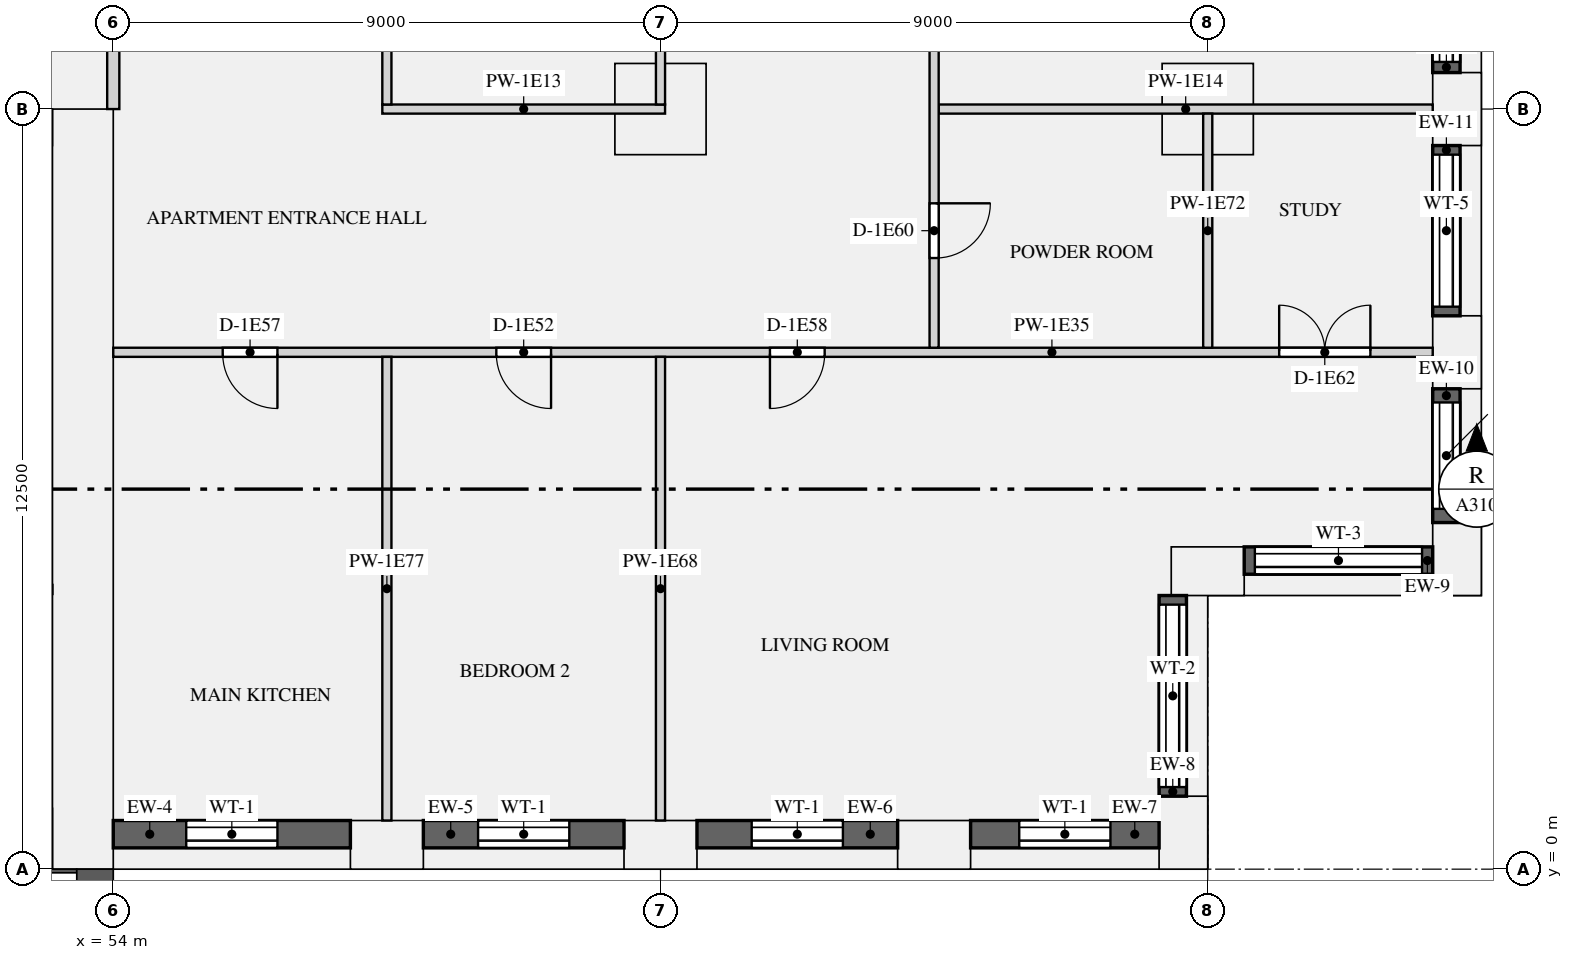
"""IFC4 building model, lengths in metres.
Left out: names, types, materials, properties, quantities, classifications, styles, units other than length and angle.
Written with IfcOpenShell. Run it as: python <this file> out.ifc"""

import sys

from ifc_helpers import new_model, si_unit, direction, frame, frame_2d, origin, origin_2d, place, context, subcontext, project, spatial, rectangle, extrude, element, fill, save


model = new_model("IFC4")
c1 = context("Model", 3, precision=1e-05, world=origin(), true_north=direction((0.0, 1.0)))
c2 = subcontext(c1, "Body", "Model", "MODEL_VIEW")
j1 = project(units=[si_unit("LENGTHUNIT", "METRE"), si_unit("PLANEANGLEUNIT", "RADIAN")], contexts=[c1])
p1 = place(None, origin())
s1 = spatial("IfcSite", under=j1, at=p1, CompositionType="ELEMENT")
p2 = place(p1, origin())
s2 = spatial("IfcBuilding", under=s1, at=p2, CompositionType="ELEMENT")
p3 = place(p2, frame((0.0, 0.0, 54.15)))
s3 = spatial("IfcBuildingStorey", under=s2, at=p3, CompositionType="ELEMENT", Elevation=54.15)
for number, where, z_axis, x_axis in (
    (1, (58.5, 0.4, 0.0), (0.0, 0.0, 1.0), (1.0, 0.0, 0.0)),
    (2, (63.0, 0.4, 0.0), (0.0, 0.0, 1.0), (1.0, 0.0, 0.0)),
    (3, (67.5, 0.4, 0.0), (0.0, 0.0, 1.0), (1.0, 0.0, 0.0)),
    (4, (71.6, 0.6, 0.0), (0.0, 0.0, 1.0), (0.0, 1.0, 0.0)),
    (5, (72.0, 4.9, 0.0), (0.0, 0.0, 1.0), (1.0, 0.0, 0.0)),
    (6, (76.1, 5.1, 0.0), (0.0, 0.0, 1.0), (0.0, 1.0, 0.0)),
    (7, (76.1, 8.5, 0.0), (0.0, 0.0, 1.0), (0.0, 1.0, 0.0)),
    (8, (76.1, 12.5, 0.0), (0.0, 0.0, 1.0), (0.0, 1.0, 0.0)),
):
    element("IfcColumn", number, at=place(p3, frame(where, z_axis=z_axis, x_axis=x_axis)), inside=s3, PredefinedType="USERDEFINED", context=c2, shape_type="SweptSolid", body=[
        extrude(rectangle(XDim=1.2, YDim=0.8, at=origin_2d()), origin(), (0.0, 0.0, 1.0), 3.15),
    ])
for number, where, z_axis, x_axis in (
    (9, (63.0, 12.5, 0.0), (0.0, 0.0, 1.0), (1.0, 0.0, 0.0)),
    (10, (72.0, 12.5, 0.0), (0.0, 0.0, 1.0), (1.0, 0.0, 0.0)),
):
    element("IfcColumn", number, at=place(p3, frame(where, z_axis=z_axis, x_axis=x_axis)), inside=s3, PredefinedType="COLUMN", context=c2, shape_type="SweptSolid", body=[
        extrude(rectangle(XDim=1.5, YDim=1.5, at=origin_2d()), origin(), (0.0, 0.0, 1.0), 3.15),
    ])
p4 = place(p3, frame((53.5, 0.0, 0.0), z_axis=(0.0, 0.0, 1.0), x_axis=(0.0, 1.0, 0.0)))
e11 = element("IfcWall", 11, at=p4, inside=s3, PredefinedType="SHEAR", context=c2, shape_type="SweptSolid", body=[
    extrude(rectangle(XDim=12.5, YDim=1.0, at=frame_2d((6.25, 0.0))), origin(), (0.0, 0.0, 1.0), 3.15),
])
p5 = place(p3, frame((54.0, 0.575, 0.9), z_axis=(0.0, 0.0, 1.0), x_axis=(1.0, 0.0, 0.0)))
e12 = element("IfcWall", 12, at=p5, inside=s3, PredefinedType="SOLIDWALL", context=c2, shape_type="SweptSolid", body=[
    extrude(rectangle(XDim=3.9, YDim=0.45, at=frame_2d((1.95, 0.0))), origin(), (0.0, 0.0, 1.0), 1.93),
])
p6 = place(p5, frame((1.2, 0.0, 0.15)))
e13 = element("IfcOpeningElement", 13, at=p6, cuts=e12, PredefinedType="OPENING", context=c2, shape_type="SweptSolid", body=[
    extrude(rectangle(XDim=1.5, YDim=1.5, at=frame_2d((0.75, 0.75))), frame((0.0, 0.235, 0.0), z_axis=(0.0, -1.0, 0.0), x_axis=(1.0, 0.0, 0.0)), (0.0, 0.0, 1.0), 0.47),
])
p7 = place(p3, frame((59.1, 0.575, 0.9), z_axis=(0.0, 0.0, 1.0), x_axis=(1.0, 0.0, 0.0)))
e14 = element("IfcWall", 14, at=p7, inside=s3, PredefinedType="SOLIDWALL", context=c2, shape_type="SweptSolid", body=[
    extrude(rectangle(XDim=3.3, YDim=0.45, at=frame_2d((1.65, 0.0))), origin(), (0.0, 0.0, 1.0), 1.93),
])
p8 = place(p7, frame((0.9, 0.0, 0.15)))
e15 = element("IfcOpeningElement", 15, at=p8, cuts=e14, PredefinedType="OPENING", context=c2, shape_type="SweptSolid", body=[
    extrude(rectangle(XDim=1.5, YDim=1.5, at=frame_2d((0.75, 0.75))), frame((0.0, 0.235, 0.0), z_axis=(0.0, -1.0, 0.0), x_axis=(1.0, 0.0, 0.0)), (0.0, 0.0, 1.0), 0.47),
])
p9 = place(p3, frame((63.6, 0.575, 0.9), z_axis=(0.0, 0.0, 1.0), x_axis=(1.0, 0.0, 0.0)))
e16 = element("IfcWall", 16, at=p9, inside=s3, PredefinedType="SOLIDWALL", context=c2, shape_type="SweptSolid", body=[
    extrude(rectangle(XDim=3.3, YDim=0.45, at=frame_2d((1.65, 0.0))), origin(), (0.0, 0.0, 1.0), 1.93),
])
p10 = place(p9, frame((0.9, 0.0, 0.15)))
e17 = element("IfcOpeningElement", 17, at=p10, cuts=e16, PredefinedType="OPENING", context=c2, shape_type="SweptSolid", body=[
    extrude(rectangle(XDim=1.5, YDim=1.5, at=frame_2d((0.75, 0.75))), frame((0.0, 0.235, 0.0), z_axis=(0.0, -1.0, 0.0), x_axis=(1.0, 0.0, 0.0)), (0.0, 0.0, 1.0), 0.47),
])
p11 = place(p3, frame((68.1, 0.575, 0.9), z_axis=(0.0, 0.0, 1.0), x_axis=(1.0, 0.0, 0.0)))
e18 = element("IfcWall", 18, at=p11, inside=s3, PredefinedType="SOLIDWALL", context=c2, shape_type="SweptSolid", body=[
    extrude(rectangle(XDim=3.1, YDim=0.45, at=frame_2d((1.55, 0.0))), origin(), (0.0, 0.0, 1.0), 1.93),
])
p12 = place(p11, frame((0.8, 0.0, 0.15)))
e19 = element("IfcOpeningElement", 19, at=p12, cuts=e18, PredefinedType="OPENING", context=c2, shape_type="SweptSolid", body=[
    extrude(rectangle(XDim=1.5, YDim=1.5, at=frame_2d((0.75, 0.75))), frame((0.0, 0.235, 0.0), z_axis=(0.0, -1.0, 0.0), x_axis=(1.0, 0.0, 0.0)), (0.0, 0.0, 1.0), 0.47),
])
p13 = place(p3, frame((71.425, 1.2, 0.9), z_axis=(0.0, 0.0, 1.0), x_axis=(0.0, 1.0, 0.0)))
e20 = element("IfcWall", 20, at=p13, inside=s3, PredefinedType="SOLIDWALL", context=c2, shape_type="SweptSolid", body=[
    extrude(rectangle(XDim=3.3, YDim=0.45, at=frame_2d((1.65, 0.0))), origin(), (0.0, 0.0, 1.0), 1.93),
])
p14 = place(p13, frame((0.15, 0.0, 0.15)))
e21 = element("IfcOpeningElement", 21, at=p14, cuts=e20, PredefinedType="OPENING", context=c2, shape_type="SweptSolid", body=[
    extrude(rectangle(XDim=3.0, YDim=1.5, at=frame_2d((1.5, 0.75))), frame((0.0, 0.235, 0.0), z_axis=(0.0, -1.0, 0.0), x_axis=(1.0, 0.0, 0.0)), (0.0, 0.0, 1.0), 0.47),
])
p15 = place(p3, frame((72.6, 5.075, 0.9), z_axis=(0.0, 0.0, 1.0), x_axis=(1.0, 0.0, 0.0)))
e22 = element("IfcWall", 22, at=p15, inside=s3, PredefinedType="SOLIDWALL", context=c2, shape_type="SweptSolid", body=[
    extrude(rectangle(XDim=3.1, YDim=0.45, at=frame_2d((1.55, 0.0))), origin(), (0.0, 0.0, 1.0), 1.93),
])
p16 = place(p15, frame((0.175, 0.0, 0.15)))
e23 = element("IfcOpeningElement", 23, at=p16, cuts=e22, PredefinedType="OPENING", context=c2, shape_type="SweptSolid", body=[
    extrude(rectangle(XDim=2.75, YDim=1.5, at=frame_2d((1.375, 0.75))), frame((0.0, 0.235, 0.0), z_axis=(0.0, -1.0, 0.0), x_axis=(1.0, 0.0, 0.0)), (0.0, 0.0, 1.0), 0.47),
])
p17 = place(p3, frame((75.925, 5.7, 0.9), z_axis=(0.0, 0.0, 1.0), x_axis=(0.0, 1.0, 0.0)))
e24 = element("IfcWall", 24, at=p17, inside=s3, PredefinedType="SOLIDWALL", context=c2, shape_type="SweptSolid", body=[
    extrude(rectangle(XDim=2.2, YDim=0.45, at=frame_2d((1.1, 0.0))), origin(), (0.0, 0.0, 1.0), 1.93),
])
p18 = place(p17, frame((0.225, 0.0, 0.15)))
e25 = element("IfcOpeningElement", 25, at=p18, cuts=e24, PredefinedType="OPENING", context=c2, shape_type="SweptSolid", body=[
    extrude(rectangle(XDim=1.75, YDim=1.5, at=frame_2d((0.875, 0.75))), frame((0.0, 0.235, 0.0), z_axis=(0.0, -1.0, 0.0), x_axis=(1.0, 0.0, 0.0)), (0.0, 0.0, 1.0), 0.47),
])
p19 = place(p3, frame((75.925, 9.1, 0.9), z_axis=(0.0, 0.0, 1.0), x_axis=(0.0, 1.0, 0.0)))
e26 = element("IfcWall", 26, at=p19, inside=s3, PredefinedType="SOLIDWALL", context=c2, shape_type="SweptSolid", body=[
    extrude(rectangle(XDim=2.8, YDim=0.45, at=frame_2d((1.4, 0.0))), origin(), (0.0, 0.0, 1.0), 1.93),
])
p20 = place(p19, frame((0.15, 0.0, 0.15)))
e27 = element("IfcOpeningElement", 27, at=p20, cuts=e26, PredefinedType="OPENING", context=c2, shape_type="SweptSolid", body=[
    extrude(rectangle(XDim=2.5, YDim=1.5, at=frame_2d((1.25, 0.75))), frame((0.0, 0.235, 0.0), z_axis=(0.0, -1.0, 0.0), x_axis=(1.0, 0.0, 0.0)), (0.0, 0.0, 1.0), 0.47),
])
p21 = place(p3, frame((75.925, 13.1, 0.9), z_axis=(0.0, 0.0, 1.0), x_axis=(0.0, 1.0, 0.0)))
e28 = element("IfcWall", 28, at=p21, inside=s3, PredefinedType="SOLIDWALL", context=c2, shape_type="SweptSolid", body=[
    extrude(rectangle(XDim=2.6, YDim=0.45, at=frame_2d((1.3, 0.0))), origin(), (0.0, 0.0, 1.0), 1.93),
])
p22 = place(p21, frame((0.175, 0.0, 0.15)))
e29 = element("IfcOpeningElement", 29, at=p22, cuts=e28, PredefinedType="OPENING", context=c2, shape_type="SweptSolid", body=[
    extrude(rectangle(XDim=2.25, YDim=1.5, at=frame_2d((1.125, 0.75))), frame((0.0, 0.235, 0.0), z_axis=(0.0, -1.0, 0.0), x_axis=(1.0, 0.0, 0.0)), (0.0, 0.0, 1.0), 0.47),
])
p23 = place(p3, frame((54.0, 12.5, 0.0), z_axis=(0.0, 0.0, 1.0), x_axis=(0.0, 1.0, 0.0)))
e30 = element("IfcWall", 30, at=p23, inside=s3, PredefinedType="PARTITIONING", context=c2, shape_type="SweptSolid", body=[
    extrude(rectangle(XDim=3.4, YDim=0.2, at=frame_2d((1.7, 0.0))), origin(), (0.0, 0.0, 1.0), 2.83),
])
p24 = place(p3, frame((58.425, 12.5, 0.0), z_axis=(0.0, 0.0, 1.0), x_axis=(1.0, 0.0, 0.0)))
e31 = element("IfcWall", 31, at=p24, inside=s3, PredefinedType="PARTITIONING", context=c2, shape_type="SweptSolid", body=[
    extrude(rectangle(XDim=4.65, YDim=0.15, at=frame_2d((2.325, 0.0))), origin(), (0.0, 0.0, 1.0), 2.83),
])
p25 = place(p3, frame((67.575, 12.5, 0.0), z_axis=(0.0, 0.0, 1.0), x_axis=(1.0, 0.0, 0.0)))
e32 = element("IfcWall", 32, at=p25, inside=s3, PredefinedType="PARTITIONING", context=c2, shape_type="SweptSolid", body=[
    extrude(rectangle(XDim=8.125, YDim=0.15, at=frame_2d((4.062, 0.0))), origin(), (0.0, 0.0, 1.0), 2.83),
])
p26 = place(p3, frame((54.0, 8.5, 0.0), z_axis=(0.0, 0.0, 1.0), x_axis=(1.0, 0.0, 0.0)))
e33 = element("IfcWall", 33, at=p26, inside=s3, PredefinedType="PARTITIONING", context=c2, shape_type="SweptSolid", body=[
    extrude(rectangle(XDim=21.7, YDim=0.15, at=frame_2d((10.85, 0.0))), origin(), (0.0, 0.0, 1.0), 2.83),
])
p27 = place(p26, frame((6.3, 0.0, 0.0)))
e34 = element("IfcOpeningElement", 34, at=p27, cuts=e33, PredefinedType="OPENING", context=c2, shape_type="SweptSolid", body=[
    extrude(rectangle(XDim=0.9, YDim=2.1, at=frame_2d((0.45, 1.05))), frame((0.0, 0.085, 0.0), z_axis=(0.0, -1.0, 0.0), x_axis=(1.0, 0.0, 0.0)), (0.0, 0.0, 1.0), 0.17),
])
p28 = place(p26, frame((1.8, 0.0, 0.0)))
e35 = element("IfcOpeningElement", 35, at=p28, cuts=e33, PredefinedType="OPENING", context=c2, shape_type="SweptSolid", body=[
    extrude(rectangle(XDim=0.9, YDim=2.1, at=frame_2d((0.45, 1.05))), frame((0.0, 0.085, 0.0), z_axis=(0.0, -1.0, 0.0), x_axis=(1.0, 0.0, 0.0)), (0.0, 0.0, 1.0), 0.17),
])
p29 = place(p26, frame((10.8, 0.0, 0.0)))
e36 = element("IfcOpeningElement", 36, at=p29, cuts=e33, PredefinedType="OPENING", context=c2, shape_type="SweptSolid", body=[
    extrude(rectangle(XDim=0.9, YDim=2.1, at=frame_2d((0.45, 1.05))), frame((0.0, 0.085, 0.0), z_axis=(0.0, -1.0, 0.0), x_axis=(1.0, 0.0, 0.0)), (0.0, 0.0, 1.0), 0.17),
])
p30 = place(p26, frame((19.175, 0.0, 0.0)))
e37 = element("IfcOpeningElement", 37, at=p30, cuts=e33, PredefinedType="OPENING", context=c2, shape_type="SweptSolid", body=[
    extrude(rectangle(XDim=1.5, YDim=2.1, at=frame_2d((0.75, 1.05))), frame((0.0, 0.085, 0.0), z_axis=(0.0, -1.0, 0.0), x_axis=(1.0, 0.0, 0.0)), (0.0, 0.0, 1.0), 0.17),
])
p31 = place(p3, frame((63.0, 0.8, 0.0), z_axis=(0.0, 0.0, 1.0), x_axis=(0.0, 1.0, 0.0)))
e38 = element("IfcWall", 38, at=p31, inside=s3, PredefinedType="PARTITIONING", context=c2, shape_type="SweptSolid", body=[
    extrude(rectangle(XDim=7.625, YDim=0.15, at=frame_2d((3.812, 0.0))), origin(), (0.0, 0.0, 1.0), 2.83),
])
p32 = place(p3, frame((63.0, 12.575, 0.0), z_axis=(0.0, 0.0, 1.0), x_axis=(0.0, 1.0, 0.0)))
e39 = element("IfcWall", 39, at=p32, inside=s3, PredefinedType="PARTITIONING", context=c2, shape_type="SweptSolid", body=[
    extrude(rectangle(XDim=15.85, YDim=0.15, at=frame_2d((7.925, 0.0))), origin(), (0.0, 0.0, 1.0), 2.83),
])
p33 = place(p32, frame((6.85, 0.0, 0.0)))
e40 = element("IfcOpeningElement", 40, at=p33, cuts=e39, PredefinedType="OPENING", context=c2, shape_type="SweptSolid", body=[
    extrude(rectangle(XDim=0.9, YDim=2.1, at=frame_2d((0.45, 1.05))), frame((0.0, 0.085, 0.0), z_axis=(0.0, -1.0, 0.0), x_axis=(1.0, 0.0, 0.0)), (0.0, 0.0, 1.0), 0.17),
])
p34 = place(p3, frame((72.0, 8.575, 0.0), z_axis=(0.0, 0.0, 1.0), x_axis=(0.0, 1.0, 0.0)))
e41 = element("IfcWall", 41, at=p34, inside=s3, PredefinedType="PARTITIONING", context=c2, shape_type="SweptSolid", body=[
    extrude(rectangle(XDim=3.85, YDim=0.15, at=frame_2d((1.925, 0.0))), origin(), (0.0, 0.0, 1.0), 2.83),
])
p35 = place(p3, frame((58.5, 0.8, 0.0), z_axis=(0.0, 0.0, 1.0), x_axis=(0.0, 1.0, 0.0)))
e42 = element("IfcWall", 42, at=p35, inside=s3, PredefinedType="PARTITIONING", context=c2, shape_type="SweptSolid", body=[
    extrude(rectangle(XDim=7.625, YDim=0.15, at=frame_2d((3.812, 0.0))), origin(), (0.0, 0.0, 1.0), 2.83),
])
p36 = place(p3, frame((58.5, 12.575, 0.0), z_axis=(0.0, 0.0, 1.0), x_axis=(0.0, 1.0, 0.0)))
e43 = element("IfcWall", 43, at=p36, inside=s3, PredefinedType="PARTITIONING", context=c2, shape_type="SweptSolid", body=[
    extrude(rectangle(XDim=10.325, YDim=0.15, at=frame_2d((5.163, 0.0))), origin(), (0.0, 0.0, 1.0), 2.83),
])
p37 = place(p36, frame((1.475, 0.0, 0.0)))
e44 = element("IfcOpeningElement", 44, at=p37, cuts=e43, PredefinedType="OPENING", context=c2, shape_type="SweptSolid", body=[
    extrude(rectangle(XDim=0.9, YDim=2.1, at=frame_2d((0.45, 1.05))), frame((0.0, 0.085, 0.0), z_axis=(0.0, -1.0, 0.0), x_axis=(1.0, 0.0, 0.0)), (0.0, 0.0, 1.0), 0.17),
])
p38 = place(p3, frame((67.5, 8.575, 0.0), z_axis=(0.0, 0.0, 1.0), x_axis=(0.0, 1.0, 0.0)))
e45 = element("IfcWall", 45, at=p38, inside=s3, PredefinedType="PARTITIONING", context=c2, shape_type="SweptSolid", body=[
    extrude(rectangle(XDim=15.35, YDim=0.15, at=frame_2d((7.675, 0.0))), origin(), (0.0, 0.0, 1.0), 2.83),
])
p39 = place(p38, frame((7.475, 0.0, 0.0)))
e46 = element("IfcOpeningElement", 46, at=p39, cuts=e45, PredefinedType="OPENING", context=c2, shape_type="SweptSolid", body=[
    extrude(rectangle(XDim=0.9, YDim=2.1, at=frame_2d((0.45, 1.05))), frame((0.0, 0.085, 0.0), z_axis=(0.0, -1.0, 0.0), x_axis=(1.0, 0.0, 0.0)), (0.0, 0.0, 1.0), 0.17),
])
p40 = place(p38, frame((1.475, 0.0, 0.0)))
e47 = element("IfcOpeningElement", 47, at=p40, cuts=e45, PredefinedType="OPENING", context=c2, shape_type="SweptSolid", body=[
    extrude(rectangle(XDim=0.9, YDim=2.1, at=frame_2d((0.45, 1.05))), frame((0.0, 0.085, 0.0), z_axis=(0.0, -1.0, 0.0), x_axis=(1.0, 0.0, 0.0)), (0.0, 0.0, 1.0), 0.17),
])
p41 = place(p6, origin())
e48 = element("IfcWindow", 48, at=p41, inside=s3, PartitioningType="SINGLE_PANEL", PredefinedType="WINDOW", context=c2, shape_type="SweptSolid", body=[
    extrude(rectangle(XDim=1.5, YDim=1.5, at=frame_2d((0.75, 0.75))), frame((0.0, -0.065, 0.0), z_axis=(0.0, -1.0, 0.0), x_axis=(1.0, 0.0, 0.0)), (0.0, 0.0, 1.0), 0.06),
])
fill(e13, e48)
p42 = place(p8, origin())
e49 = element("IfcWindow", 49, at=p42, inside=s3, PartitioningType="SINGLE_PANEL", PredefinedType="WINDOW", context=c2, shape_type="SweptSolid", body=[
    extrude(rectangle(XDim=1.5, YDim=1.5, at=frame_2d((0.75, 0.75))), frame((0.0, -0.065, 0.0), z_axis=(0.0, -1.0, 0.0), x_axis=(1.0, 0.0, 0.0)), (0.0, 0.0, 1.0), 0.06),
])
fill(e15, e49)
p43 = place(p10, origin())
e50 = element("IfcWindow", 50, at=p43, inside=s3, PartitioningType="SINGLE_PANEL", PredefinedType="WINDOW", context=c2, shape_type="SweptSolid", body=[
    extrude(rectangle(XDim=1.5, YDim=1.5, at=frame_2d((0.75, 0.75))), frame((0.0, -0.065, 0.0), z_axis=(0.0, -1.0, 0.0), x_axis=(1.0, 0.0, 0.0)), (0.0, 0.0, 1.0), 0.06),
])
fill(e17, e50)
p44 = place(p12, origin())
e51 = element("IfcWindow", 51, at=p44, inside=s3, PartitioningType="SINGLE_PANEL", PredefinedType="WINDOW", context=c2, shape_type="SweptSolid", body=[
    extrude(rectangle(XDim=1.5, YDim=1.5, at=frame_2d((0.75, 0.75))), frame((0.0, -0.065, 0.0), z_axis=(0.0, -1.0, 0.0), x_axis=(1.0, 0.0, 0.0)), (0.0, 0.0, 1.0), 0.06),
])
fill(e19, e51)
p45 = place(p14, origin())
e52 = element("IfcWindow", 52, at=p45, inside=s3, PartitioningType="SINGLE_PANEL", PredefinedType="WINDOW", context=c2, shape_type="SweptSolid", body=[
    extrude(rectangle(XDim=3.0, YDim=1.5, at=frame_2d((1.5, 0.75))), frame((0.0, -0.065, 0.0), z_axis=(0.0, -1.0, 0.0), x_axis=(1.0, 0.0, 0.0)), (0.0, 0.0, 1.0), 0.06),
])
fill(e21, e52)
p46 = place(p16, origin())
e53 = element("IfcWindow", 53, at=p46, inside=s3, PartitioningType="SINGLE_PANEL", PredefinedType="WINDOW", context=c2, shape_type="SweptSolid", body=[
    extrude(rectangle(XDim=2.75, YDim=1.5, at=frame_2d((1.375, 0.75))), frame((0.0, -0.065, 0.0), z_axis=(0.0, -1.0, 0.0), x_axis=(1.0, 0.0, 0.0)), (0.0, 0.0, 1.0), 0.06),
])
fill(e23, e53)
p47 = place(p18, origin())
e54 = element("IfcWindow", 54, at=p47, inside=s3, PartitioningType="SINGLE_PANEL", PredefinedType="WINDOW", context=c2, shape_type="SweptSolid", body=[
    extrude(rectangle(XDim=1.75, YDim=1.5, at=frame_2d((0.875, 0.75))), frame((0.0, -0.065, 0.0), z_axis=(0.0, -1.0, 0.0), x_axis=(1.0, 0.0, 0.0)), (0.0, 0.0, 1.0), 0.06),
])
fill(e25, e54)
p48 = place(p20, origin())
e55 = element("IfcWindow", 55, at=p48, inside=s3, PartitioningType="SINGLE_PANEL", PredefinedType="WINDOW", context=c2, shape_type="SweptSolid", body=[
    extrude(rectangle(XDim=2.5, YDim=1.5, at=frame_2d((1.25, 0.75))), frame((0.0, -0.065, 0.0), z_axis=(0.0, -1.0, 0.0), x_axis=(1.0, 0.0, 0.0)), (0.0, 0.0, 1.0), 0.06),
])
fill(e27, e55)
p49 = place(p22, origin())
e56 = element("IfcWindow", 56, at=p49, inside=s3, PartitioningType="SINGLE_PANEL", PredefinedType="WINDOW", context=c2, shape_type="SweptSolid", body=[
    extrude(rectangle(XDim=2.25, YDim=1.5, at=frame_2d((1.125, 0.75))), frame((0.0, -0.065, 0.0), z_axis=(0.0, -1.0, 0.0), x_axis=(1.0, 0.0, 0.0)), (0.0, 0.0, 1.0), 0.06),
])
fill(e29, e56)
p50 = place(p27, frame((0.9, 0.0, 0.0), z_axis=(0.0, 0.0, 1.0), x_axis=(-1.0, 0.0, 0.0)))
e57 = element("IfcDoor", 57, at=p50, inside=s3, OperationType="SINGLE_SWING_LEFT", PredefinedType="DOOR", context=c2, shape_type="SweptSolid", body=[
    extrude(rectangle(XDim=0.9, YDim=2.1, at=frame_2d((0.45, 1.05))), frame((0.0, 0.025, 0.0), z_axis=(0.0, -1.0, 0.0), x_axis=(1.0, 0.0, 0.0)), (0.0, 0.0, 1.0), 0.05),
])
fill(e34, e57)
p51 = place(p28, frame((0.9, 0.0, 0.0), z_axis=(0.0, 0.0, 1.0), x_axis=(-1.0, 0.0, 0.0)))
e58 = element("IfcDoor", 58, at=p51, inside=s3, OperationType="SINGLE_SWING_LEFT", PredefinedType="DOOR", context=c2, shape_type="SweptSolid", body=[
    extrude(rectangle(XDim=0.9, YDim=2.1, at=frame_2d((0.45, 1.05))), frame((0.0, 0.025, 0.0), z_axis=(0.0, -1.0, 0.0), x_axis=(1.0, 0.0, 0.0)), (0.0, 0.0, 1.0), 0.05),
])
fill(e35, e58)
p52 = place(p29, frame((0.9, 0.0, 0.0), z_axis=(0.0, 0.0, 1.0), x_axis=(-1.0, 0.0, 0.0)))
e59 = element("IfcDoor", 59, at=p52, inside=s3, OperationType="SINGLE_SWING_RIGHT", PredefinedType="DOOR", context=c2, shape_type="SweptSolid", body=[
    extrude(rectangle(XDim=0.9, YDim=2.1, at=frame_2d((0.45, 1.05))), frame((0.0, 0.025, 0.0), z_axis=(0.0, -1.0, 0.0), x_axis=(1.0, 0.0, 0.0)), (0.0, 0.0, 1.0), 0.05),
])
fill(e36, e59)
p53 = place(p40, frame((0.9, 0.0, 0.0), z_axis=(0.0, 0.0, 1.0), x_axis=(-1.0, 0.0, 0.0)))
e60 = element("IfcDoor", 60, at=p53, inside=s3, OperationType="SINGLE_SWING_LEFT", PredefinedType="DOOR", context=c2, shape_type="SweptSolid", body=[
    extrude(rectangle(XDim=0.9, YDim=2.1, at=frame_2d((0.45, 1.05))), frame((0.0, 0.025, 0.0), z_axis=(0.0, -1.0, 0.0), x_axis=(1.0, 0.0, 0.0)), (0.0, 0.0, 1.0), 0.05),
])
fill(e47, e60)
p54 = place(p30, origin())
e61 = element("IfcDoor", 61, at=p54, inside=s3, OperationType="DOUBLE_DOOR_SINGLE_SWING", PredefinedType="DOOR", context=c2, shape_type="SweptSolid", body=[
    extrude(rectangle(XDim=1.5, YDim=2.1, at=frame_2d((0.75, 1.05))), frame((0.0, 0.025, 0.0), z_axis=(0.0, -1.0, 0.0), x_axis=(1.0, 0.0, 0.0)), (0.0, 0.0, 1.0), 0.05),
])
fill(e37, e61)
save(model, sys.argv[1])
